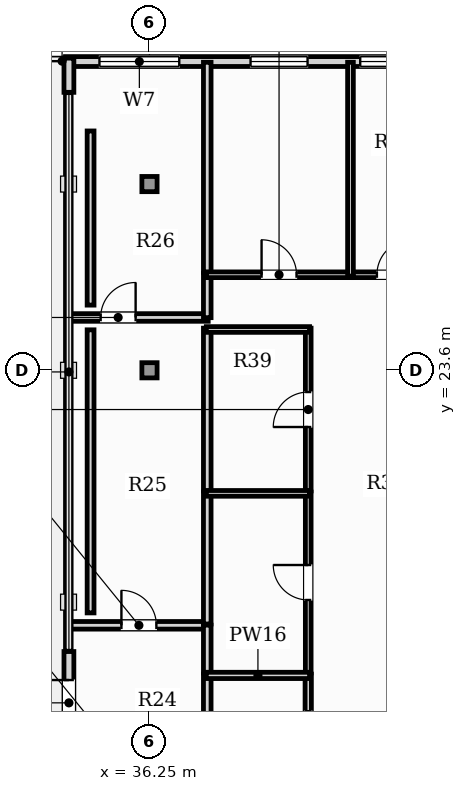
"""IFC4 building model, lengths in metres.
Left out: names, types, materials, properties, quantities, classifications, styles, units other than length and angle.
Written with IfcOpenShell. Run it as: python <this file> out.ifc"""

import sys

from ifc_helpers import new_model, si_unit, direction, frame, frame_2d, origin, origin_2d, place, context, subcontext, project, spatial, rectangle, hollow_rectangle, extrude, element, fill, save


model = new_model("IFC4")
c1 = context("Model", 3, precision=1e-05, world=origin(), true_north=direction((0.0, 1.0)))
c2 = subcontext(c1, "Body", "Model", "MODEL_VIEW")
j1 = project(units=[si_unit("LENGTHUNIT", "METRE"), si_unit("PLANEANGLEUNIT", "RADIAN")], contexts=[c1])
p1 = place(None, origin())
s1 = spatial("IfcSite", under=j1, at=p1, CompositionType="ELEMENT")
p2 = place(p1, origin())
s2 = spatial("IfcBuilding", under=s1, at=p2, CompositionType="ELEMENT")
p3 = place(p2, frame((0.0, 0.0, 337.5)))
s3 = spatial("IfcBuildingStorey", under=s2, at=p3, CompositionType="ELEMENT", Elevation=337.5)
for number, where, z_axis, x_axis in (
    (1, (36.25, 23.6, 0.0), (0.0, 0.0, 1.0), (1.0, 0.0, 0.0)),
    (2, (36.25, 28.5, 0.0), (0.0, 0.0, 1.0), (1.0, 0.0, 0.0)),
):
    element("IfcColumn", number, at=place(p3, frame(where, z_axis=z_axis, x_axis=x_axis)), inside=s3, PredefinedType="COLUMN", context=c2, shape_type="SweptSolid", body=[
        extrude(hollow_rectangle(XDim=0.4, YDim=0.4, WallThickness=0.02, at=origin_2d()), origin(), (0.0, 0.0, 1.0), 3.85),
    ])
p4 = place(p3, frame((44.912, 31.724, 0.0), z_axis=(0.0, 0.0, 1.0), x_axis=(-1.0, 0.0, 0.0)))
e3 = element("IfcWall", 3, at=p4, inside=s3, PredefinedType="SOLIDWALL", context=c2, shape_type="SweptSolid", body=[
    extrude(rectangle(XDim=10.872, YDim=0.26, at=frame_2d((5.436, 0.0))), origin(), (0.0, 0.0, 1.0), 3.63),
])
p5 = place(p4, frame((7.878, 0.0, 0.85)))
e4 = element("IfcOpeningElement", 4, at=p5, cuts=e3, PredefinedType="OPENING", context=c2, shape_type="SweptSolid", body=[
    extrude(rectangle(XDim=2.1, YDim=2.05, at=frame_2d((1.05, 1.025))), frame((0.0, 0.14, 0.0), z_axis=(0.0, -1.0, 0.0), x_axis=(1.0, 0.0, 0.0)), (0.0, 0.0, 1.0), 0.28),
])
p6 = place(p4, frame((4.502, 0.0, 0.9)))
e5 = element("IfcOpeningElement", 5, at=p6, cuts=e3, PredefinedType="OPENING", context=c2, shape_type="SweptSolid", body=[
    extrude(rectangle(XDim=1.5, YDim=1.95, at=frame_2d((0.75, 0.975))), frame((0.0, 0.14, 0.0), z_axis=(0.0, -1.0, 0.0), x_axis=(1.0, 0.0, 0.0)), (0.0, 0.0, 1.0), 0.28),
])
p7 = place(p4, frame((1.617, 0.0, 0.9)))
e6 = element("IfcOpeningElement", 6, at=p7, cuts=e3, PredefinedType="OPENING", context=c2, shape_type="SweptSolid", body=[
    extrude(rectangle(XDim=1.5, YDim=1.95, at=frame_2d((0.75, 0.975))), frame((0.0, 0.14, 0.0), z_axis=(0.0, -1.0, 0.0), x_axis=(1.0, 0.0, 0.0)), (0.0, 0.0, 1.0), 0.28),
])
p8 = place(p3, frame((34.13, 12.4, 0.0), z_axis=(0.0, 0.0, 1.0), x_axis=(0.0, 1.0, 0.0)))
e7 = element("IfcWall", 7, at=p8, inside=s3, PredefinedType="SOLIDWALL", context=c2, shape_type="SweptSolid", body=[
    extrude(rectangle(XDim=3.8, YDim=0.26, at=frame_2d((1.9, 0.0))), origin(), (0.0, 0.0, 1.0), 3.17),
])
p9 = place(p8, frame((1.85, 0.0, 0.0)))
e8 = element("IfcOpeningElement", 8, at=p9, cuts=e7, PredefinedType="OPENING", context=c2, shape_type="SweptSolid", body=[
    extrude(rectangle(XDim=1.2, YDim=2.2, at=frame_2d((0.6, 1.1))), frame((0.0, 0.14, 0.0), z_axis=(0.0, -1.0, 0.0), x_axis=(1.0, 0.0, 0.0)), (0.0, 0.0, 1.0), 0.28),
])
p10 = place(p3, frame((34.13, 30.914, 0.0), z_axis=(0.0, 0.0, 1.0), x_axis=(0.0, 1.0, 0.0)))
e9 = element("IfcWall", 9, at=p10, inside=s3, PredefinedType="SOLIDWALL", context=c2, shape_type="SweptSolid", body=[
    extrude(rectangle(XDim=0.9, YDim=0.26, at=frame_2d((0.45, 0.0))), origin(), (0.0, 0.0, 1.0), 3.63),
])
p11 = place(p3, frame((34.148, 16.89, 0.0), z_axis=(0.0, 0.0, 1.0), x_axis=(1.0, 0.0, 0.0)))
e10 = element("IfcWall", 10, at=p11, inside=s3, PredefinedType="PARTITIONING", context=c2, shape_type="SweptSolid", body=[
    extrude(rectangle(XDim=3.647, YDim=0.2, at=frame_2d((1.823, 0.0))), origin(), (0.0, 0.0, 1.0), 3.63),
])
p12 = place(p11, frame((1.364, 0.0, 0.0)))
e11 = element("IfcOpeningElement", 11, at=p12, cuts=e10, PredefinedType="OPENING", context=c2, shape_type="SweptSolid", body=[
    extrude(rectangle(XDim=0.92, YDim=2.1, at=frame_2d((0.46, 1.05))), frame((0.0, 0.11, 0.0), z_axis=(0.0, -1.0, 0.0), x_axis=(1.0, 0.0, 0.0)), (0.0, 0.0, 1.0), 0.22),
])
p13 = place(p3, frame((37.77, 12.805, 0.0), z_axis=(0.0, 0.0, 1.0), x_axis=(0.0, 1.0, 0.0)))
e12 = element("IfcWall", 12, at=p13, inside=s3, PredefinedType="PARTITIONING", context=c2, shape_type="SweptSolid", body=[
    extrude(rectangle(XDim=2.802, YDim=0.2, at=frame_2d((1.401, 0.0))), origin(), (0.0, 0.0, 1.0), 3.63),
])
p14 = place(p3, frame((37.77, 15.637, 0.0), z_axis=(0.0, 0.0, 1.0), x_axis=(0.0, 1.0, 0.0)))
e13 = element("IfcWall", 13, at=p14, inside=s3, PredefinedType="PARTITIONING", context=c2, shape_type="SweptSolid", body=[
    extrude(rectangle(XDim=1.258, YDim=0.2, at=frame_2d((0.629, 0.0))), origin(), (0.0, 0.0, 1.0), 3.63),
])
p15 = place(p3, frame((34.149, 24.99, 0.0), z_axis=(0.0, 0.0, 1.0), x_axis=(1.0, 0.0, 0.0)))
e14 = element("IfcWall", 14, at=p15, inside=s3, PredefinedType="PARTITIONING", context=c2, shape_type="SweptSolid", body=[
    extrude(rectangle(XDim=3.646, YDim=0.2, at=frame_2d((1.823, 0.0))), origin(), (0.0, 0.0, 1.0), 3.63),
])
p16 = place(p15, frame((0.816, 0.0, 0.0)))
e15 = element("IfcOpeningElement", 15, at=p16, cuts=e14, PredefinedType="OPENING", context=c2, shape_type="SweptSolid", body=[
    extrude(rectangle(XDim=0.92, YDim=2.1, at=frame_2d((0.46, 1.05))), frame((0.0, 0.11, 0.0), z_axis=(0.0, -1.0, 0.0), x_axis=(1.0, 0.0, 0.0)), (0.0, 0.0, 1.0), 0.22),
])
p17 = place(p3, frame((37.77, 16.925, 0.0), z_axis=(0.0, 0.0, 1.0), x_axis=(0.0, 1.0, 0.0)))
e16 = element("IfcWall", 16, at=p17, inside=s3, PredefinedType="PARTITIONING", context=c2, shape_type="SweptSolid", body=[
    extrude(rectangle(XDim=3.472, YDim=0.2, at=frame_2d((1.736, 0.0))), origin(), (0.0, 0.0, 1.0), 3.63),
])
p18 = place(p3, frame((37.77, 20.427, 0.0), z_axis=(0.0, 0.0, 1.0), x_axis=(0.0, 1.0, 0.0)))
e17 = element("IfcWall", 17, at=p18, inside=s3, PredefinedType="PARTITIONING", context=c2, shape_type="SweptSolid", body=[
    extrude(rectangle(XDim=4.282, YDim=0.2, at=frame_2d((2.141, 0.0))), origin(), (0.0, 0.0, 1.0), 3.63),
])
p19 = place(p3, frame((37.77, 24.985, 0.0), z_axis=(0.0, 0.0, 1.0), x_axis=(0.0, 1.0, 0.0)))
e18 = element("IfcWall", 18, at=p19, inside=s3, PredefinedType="PARTITIONING", context=c2, shape_type="SweptSolid", body=[
    extrude(rectangle(XDim=1.164, YDim=0.2, at=frame_2d((0.582, 0.0))), origin(), (0.0, 0.0, 1.0), 3.63),
])
p20 = place(p3, frame((37.77, 26.179, 0.0), z_axis=(0.0, 0.0, 1.0), x_axis=(0.0, 1.0, 0.0)))
e19 = element("IfcWall", 19, at=p20, inside=s3, PredefinedType="PARTITIONING", context=c2, shape_type="SweptSolid", body=[
    extrude(rectangle(XDim=5.526, YDim=0.2, at=frame_2d((2.763, 0.0))), origin(), (0.0, 0.0, 1.0), 3.63),
])
p21 = place(p3, frame((40.427, 12.805, 0.0), z_axis=(0.0, 0.0, 1.0), x_axis=(0.0, 1.0, 0.0)))
e20 = element("IfcWall", 20, at=p21, inside=s3, PredefinedType="PLUMBINGWALL", context=c2, shape_type="SweptSolid", body=[
    extrude(rectangle(XDim=2.802, YDim=0.165, at=frame_2d((1.401, 0.0))), origin(), (0.0, 0.0, 1.0), 3.63),
])
p22 = place(p21, frame((0.976, 0.0, 0.0)))
e21 = element("IfcOpeningElement", 21, at=p22, cuts=e20, PredefinedType="OPENING", context=c2, shape_type="SweptSolid", body=[
    extrude(rectangle(XDim=0.85, YDim=2.1, at=frame_2d((0.425, 1.05))), frame((0.0, 0.093, 0.0), z_axis=(0.0, -1.0, 0.0), x_axis=(1.0, 0.0, 0.0)), (0.0, 0.0, 1.0), 0.185),
])
p23 = place(p3, frame((40.427, 15.637, 0.0), z_axis=(0.0, 0.0, 1.0), x_axis=(0.0, 1.0, 0.0)))
e22 = element("IfcWall", 22, at=p23, inside=s3, PredefinedType="PARTITIONING", context=c2, shape_type="SweptSolid", body=[
    extrude(rectangle(XDim=4.76, YDim=0.15, at=frame_2d((2.38, 0.0))), origin(), (0.0, 0.0, 1.0), 3.63),
])
p24 = place(p23, frame((1.92, 0.0, 0.0)))
e23 = element("IfcOpeningElement", 23, at=p24, cuts=e22, PredefinedType="OPENING", context=c2, shape_type="SweptSolid", body=[
    extrude(rectangle(XDim=0.92, YDim=2.1, at=frame_2d((0.46, 1.05))), frame((0.0, 0.085, 0.0), z_axis=(0.0, -1.0, 0.0), x_axis=(1.0, 0.0, 0.0)), (0.0, 0.0, 1.0), 0.17),
])
p25 = place(p3, frame((40.427, 20.427, 0.0), z_axis=(0.0, 0.0, 1.0), x_axis=(0.0, 1.0, 0.0)))
e24 = element("IfcWall", 24, at=p25, inside=s3, PredefinedType="PARTITIONING", context=c2, shape_type="SweptSolid", body=[
    extrude(rectangle(XDim=4.282, YDim=0.15, at=frame_2d((2.141, 0.0))), origin(), (0.0, 0.0, 1.0), 3.63),
])
p26 = place(p25, frame((1.681, 0.0, 0.0)))
e25 = element("IfcOpeningElement", 25, at=p26, cuts=e24, PredefinedType="OPENING", context=c2, shape_type="SweptSolid", body=[
    extrude(rectangle(XDim=0.92, YDim=2.1, at=frame_2d((0.46, 1.05))), frame((0.0, 0.085, 0.0), z_axis=(0.0, -1.0, 0.0), x_axis=(1.0, 0.0, 0.0)), (0.0, 0.0, 1.0), 0.17),
])
p27 = place(p3, frame((37.745, 24.674, 0.0), z_axis=(0.0, 0.0, 1.0), x_axis=(1.0, 0.0, 0.0)))
e26 = element("IfcWall", 26, at=p27, inside=s3, PredefinedType="PARTITIONING", context=c2, shape_type="SweptSolid", body=[
    extrude(rectangle(XDim=2.717, YDim=0.15, at=frame_2d((1.358, 0.0))), origin(), (0.0, 0.0, 1.0), 3.63),
])
p28 = place(p3, frame((37.745, 26.114, 0.0), z_axis=(0.0, 0.0, 1.0), x_axis=(1.0, 0.0, 0.0)))
e27 = element("IfcWall", 27, at=p28, inside=s3, PredefinedType="PARTITIONING", context=c2, shape_type="SweptSolid", body=[
    extrude(rectangle(XDim=3.828, YDim=0.15, at=frame_2d((1.914, 0.0))), origin(), (0.0, 0.0, 1.0), 3.63),
])
p29 = place(p28, frame((1.454, 0.0, 0.0)))
e28 = element("IfcOpeningElement", 28, at=p29, cuts=e27, PredefinedType="OPENING", context=c2, shape_type="SweptSolid", body=[
    extrude(rectangle(XDim=0.92, YDim=2.1, at=frame_2d((0.46, 1.05))), frame((0.0, 0.085, 0.0), z_axis=(0.0, -1.0, 0.0), x_axis=(1.0, 0.0, 0.0)), (0.0, 0.0, 1.0), 0.17),
])
p30 = place(p3, frame((41.603, 26.114, 0.0), z_axis=(0.0, 0.0, 1.0), x_axis=(1.0, 0.0, 0.0)))
e29 = element("IfcWall", 29, at=p30, inside=s3, PredefinedType="PARTITIONING", context=c2, shape_type="SweptSolid", body=[
    extrude(rectangle(XDim=2.182, YDim=0.15, at=frame_2d((1.091, 0.0))), origin(), (0.0, 0.0, 1.0), 3.63),
])
p31 = place(p30, frame((0.631, 0.0, 0.0)))
e30 = element("IfcOpeningElement", 30, at=p31, cuts=e29, PredefinedType="OPENING", context=c2, shape_type="SweptSolid", body=[
    extrude(rectangle(XDim=0.92, YDim=2.1, at=frame_2d((0.46, 1.05))), frame((0.0, 0.085, 0.0), z_axis=(0.0, -1.0, 0.0), x_axis=(1.0, 0.0, 0.0)), (0.0, 0.0, 1.0), 0.17),
])
p32 = place(p3, frame((37.745, 15.572, 0.0), z_axis=(0.0, 0.0, 1.0), x_axis=(1.0, 0.0, 0.0)))
e31 = element("IfcWall", 31, at=p32, inside=s3, PredefinedType="PLUMBINGWALL", context=c2, shape_type="SweptSolid", body=[
    extrude(rectangle(XDim=2.717, YDim=0.165, at=frame_2d((1.358, 0.0))), origin(), (0.0, 0.0, 1.0), 3.63),
])
p33 = place(p3, frame((37.745, 20.362, 0.0), z_axis=(0.0, 0.0, 1.0), x_axis=(1.0, 0.0, 0.0)))
e32 = element("IfcWall", 32, at=p33, inside=s3, PredefinedType="PARTITIONING", context=c2, shape_type="SweptSolid", body=[
    extrude(rectangle(XDim=2.717, YDim=0.15, at=frame_2d((1.358, 0.0))), origin(), (0.0, 0.0, 1.0), 3.63),
])
p34 = place(p3, frame((41.538, 26.079, 0.0), z_axis=(0.0, 0.0, 1.0), x_axis=(0.0, 1.0, 0.0)))
e33 = element("IfcWall", 33, at=p34, inside=s3, PredefinedType="PARTITIONING", context=c2, shape_type="SweptSolid", body=[
    extrude(rectangle(XDim=5.625, YDim=0.15, at=frame_2d((2.813, 0.0))), origin(), (0.0, 0.0, 1.0), 3.63),
])
p35 = place(p3, frame((34.7, 17.217, 0.0), z_axis=(0.0, 0.0, 1.0), x_axis=(0.0, 1.0, 0.0)))
e34 = element("IfcWall", 34, at=p35, inside=s3, PredefinedType="PARTITIONING", context=c2, shape_type="SweptSolid", body=[
    extrude(rectangle(XDim=7.448, YDim=0.18, at=frame_2d((3.724, 0.0))), origin(), (0.0, 0.0, 1.0), 3.63),
])
p36 = place(p3, frame((34.7, 25.315, 0.0), z_axis=(0.0, 0.0, 1.0), x_axis=(0.0, 1.0, 0.0)))
e35 = element("IfcWall", 35, at=p36, inside=s3, PredefinedType="PARTITIONING", context=c2, shape_type="SweptSolid", body=[
    extrude(rectangle(XDim=4.582, YDim=0.18, at=frame_2d((2.291, 0.0))), origin(), (0.0, 0.0, 1.0), 3.63),
])
p37 = place(p9, origin())
e36 = element("IfcDoor", 36, at=p37, inside=s3, OperationType="SINGLE_SWING_RIGHT", PredefinedType="DOOR", context=c2, shape_type="SweptSolid", body=[
    extrude(rectangle(XDim=1.2, YDim=2.2, at=frame_2d((0.6, 1.1))), frame((0.0, 0.025, 0.0), z_axis=(0.0, -1.0, 0.0), x_axis=(1.0, 0.0, 0.0)), (0.0, 0.0, 1.0), 0.05),
])
fill(e8, e36)
p38 = place(p5, origin())
e37 = element("IfcWindow", 37, at=p38, inside=s3, PartitioningType="SINGLE_PANEL", PredefinedType="WINDOW", context=c2, shape_type="SweptSolid", body=[
    extrude(rectangle(XDim=2.1, YDim=2.05, at=frame_2d((1.05, 1.025))), frame((0.0, 0.03, 0.0), z_axis=(0.0, -1.0, 0.0), x_axis=(1.0, 0.0, 0.0)), (0.0, 0.0, 1.0), 0.06),
])
fill(e4, e37)
p39 = place(p6, origin())
e38 = element("IfcWindow", 38, at=p39, inside=s3, PartitioningType="SINGLE_PANEL", PredefinedType="WINDOW", context=c2, shape_type="SweptSolid", body=[
    extrude(rectangle(XDim=1.5, YDim=1.95, at=frame_2d((0.75, 0.975))), frame((0.0, 0.03, 0.0), z_axis=(0.0, -1.0, 0.0), x_axis=(1.0, 0.0, 0.0)), (0.0, 0.0, 1.0), 0.06),
])
fill(e5, e38)
p40 = place(p7, origin())
e39 = element("IfcWindow", 39, at=p40, inside=s3, PartitioningType="SINGLE_PANEL", PredefinedType="WINDOW", context=c2, shape_type="SweptSolid", body=[
    extrude(rectangle(XDim=1.5, YDim=1.95, at=frame_2d((0.75, 0.975))), frame((0.0, 0.03, 0.0), z_axis=(0.0, -1.0, 0.0), x_axis=(1.0, 0.0, 0.0)), (0.0, 0.0, 1.0), 0.06),
])
fill(e6, e39)
p41 = place(p12, origin())
e40 = element("IfcDoor", 40, at=p41, inside=s3, OperationType="SINGLE_SWING_LEFT", PredefinedType="DOOR", context=c2, shape_type="SweptSolid", body=[
    extrude(rectangle(XDim=0.92, YDim=2.1, at=frame_2d((0.46, 1.05))), frame((0.0, 0.025, 0.0), z_axis=(0.0, -1.0, 0.0), x_axis=(1.0, 0.0, 0.0)), (0.0, 0.0, 1.0), 0.05),
])
fill(e11, e40)
p42 = place(p16, origin())
e41 = element("IfcDoor", 41, at=p42, inside=s3, OperationType="SINGLE_SWING_RIGHT", PredefinedType="DOOR", context=c2, shape_type="SweptSolid", body=[
    extrude(rectangle(XDim=0.92, YDim=2.1, at=frame_2d((0.46, 1.05))), frame((0.0, 0.025, 0.0), z_axis=(0.0, -1.0, 0.0), x_axis=(1.0, 0.0, 0.0)), (0.0, 0.0, 1.0), 0.05),
])
fill(e15, e41)
p43 = place(p24, origin())
e42 = element("IfcDoor", 42, at=p43, inside=s3, OperationType="SINGLE_SWING_RIGHT", PredefinedType="DOOR", context=c2, shape_type="SweptSolid", body=[
    extrude(rectangle(XDim=0.92, YDim=2.1, at=frame_2d((0.46, 1.05))), frame((0.0, 0.025, 0.0), z_axis=(0.0, -1.0, 0.0), x_axis=(1.0, 0.0, 0.0)), (0.0, 0.0, 1.0), 0.05),
])
fill(e23, e42)
p44 = place(p26, origin())
e43 = element("IfcDoor", 43, at=p44, inside=s3, OperationType="SINGLE_SWING_LEFT", PredefinedType="DOOR", context=c2, shape_type="SweptSolid", body=[
    extrude(rectangle(XDim=0.92, YDim=2.1, at=frame_2d((0.46, 1.05))), frame((0.0, 0.025, 0.0), z_axis=(0.0, -1.0, 0.0), x_axis=(1.0, 0.0, 0.0)), (0.0, 0.0, 1.0), 0.05),
])
fill(e25, e43)
p45 = place(p29, origin())
e44 = element("IfcDoor", 44, at=p45, inside=s3, OperationType="SINGLE_SWING_LEFT", PredefinedType="DOOR", context=c2, shape_type="SweptSolid", body=[
    extrude(rectangle(XDim=0.92, YDim=2.1, at=frame_2d((0.46, 1.05))), frame((0.0, 0.025, 0.0), z_axis=(0.0, -1.0, 0.0), x_axis=(1.0, 0.0, 0.0)), (0.0, 0.0, 1.0), 0.05),
])
fill(e28, e44)
p46 = place(p31, origin())
e45 = element("IfcDoor", 45, at=p46, inside=s3, OperationType="SINGLE_SWING_RIGHT", PredefinedType="DOOR", context=c2, shape_type="SweptSolid", body=[
    extrude(rectangle(XDim=0.92, YDim=2.1, at=frame_2d((0.46, 1.05))), frame((0.0, 0.025, 0.0), z_axis=(0.0, -1.0, 0.0), x_axis=(1.0, 0.0, 0.0)), (0.0, 0.0, 1.0), 0.05),
])
fill(e30, e45)
save(model, sys.argv[1])
